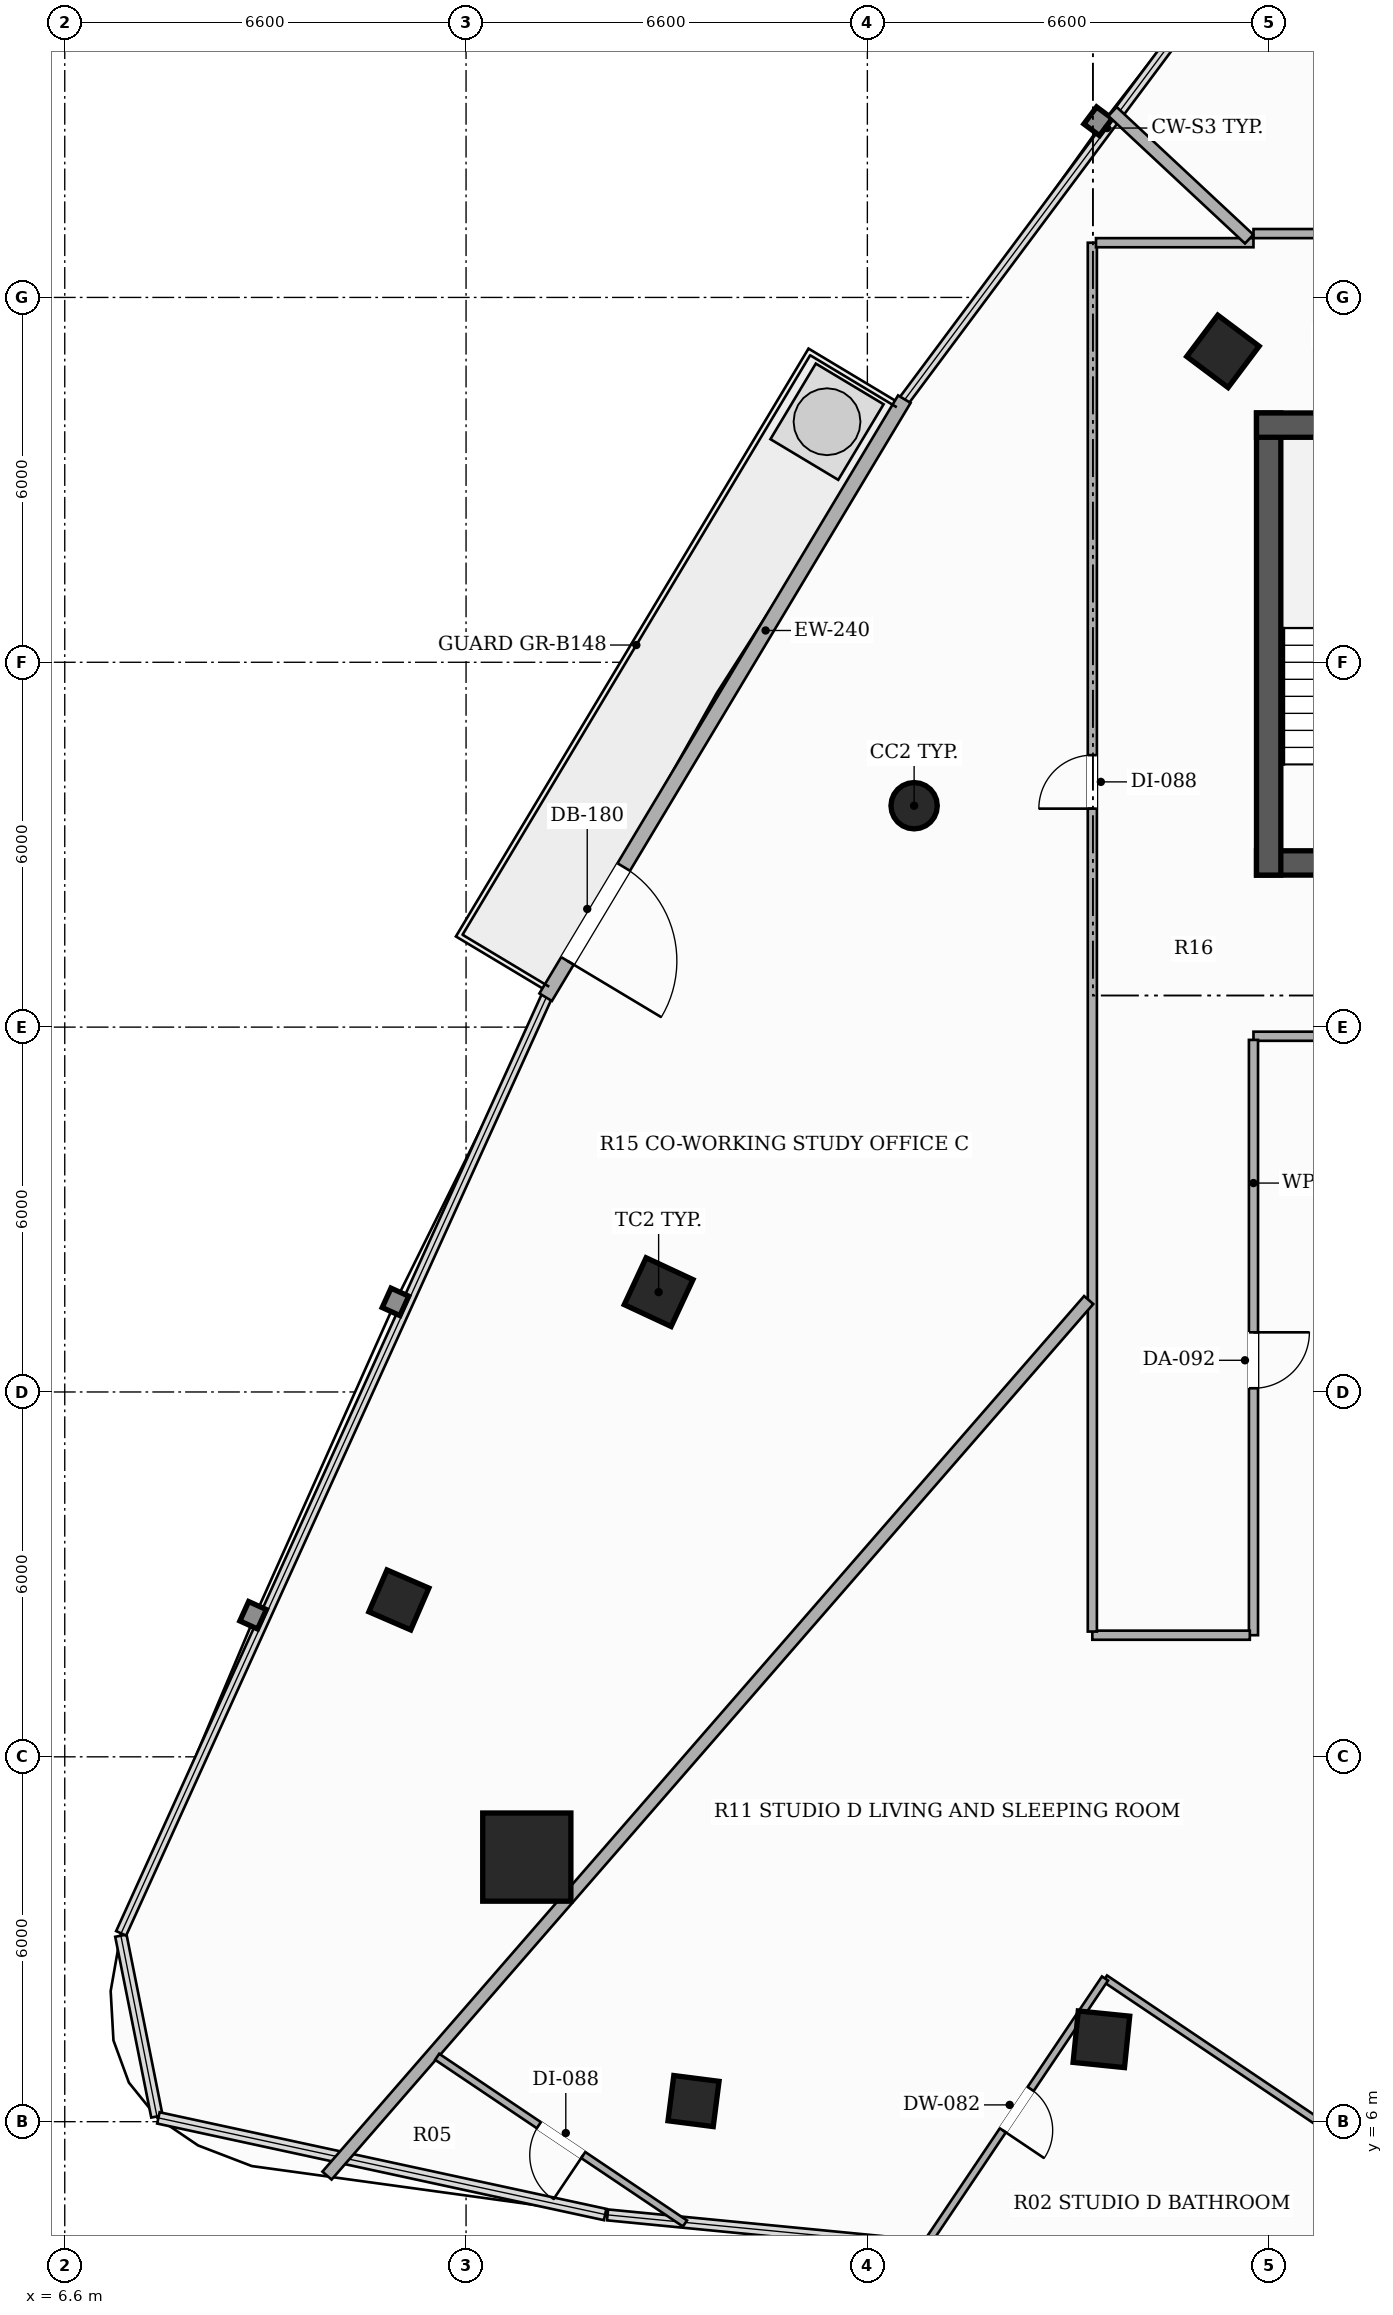
"""IFC4 building model, lengths in metres.
Left out: names, types, materials, properties, quantities, classifications, styles, units other than length and angle.
Written with IfcOpenShell. Run it as: python <this file> out.ifc"""

import sys

from ifc_helpers import new_model, si_unit, direction, frame, frame_2d, origin, origin_2d, place, context, subcontext, project, spatial, rectangle, hollow_rectangle, hollow_circle, extrude, element, fill, save


model = new_model("IFC4")
c1 = context("Model", 3, precision=1e-05, world=origin(), true_north=direction((0.0, 1.0)))
c2 = subcontext(c1, "Body", "Model", "MODEL_VIEW")
j1 = project(units=[si_unit("LENGTHUNIT", "METRE"), si_unit("PLANEANGLEUNIT", "RADIAN")], contexts=[c1])
p1 = place(None, origin())
s1 = spatial("IfcSite", under=j1, at=p1, CompositionType="ELEMENT")
p2 = place(p1, origin())
s2 = spatial("IfcBuilding", under=s1, at=p2, CompositionType="ELEMENT")
p3 = place(p2, frame((0.0, 0.0, 136.4)))
s3 = spatial("IfcBuildingStorey", under=s2, at=p3, CompositionType="ELEMENT", Elevation=136.4)
p4 = place(p3, frame((26.2, 26.7, 0.0), z_axis=(0.0, 0.0, 1.0), x_axis=(1.0, 0.0, 0.0)))
e1 = element("IfcWall", 1, at=p4, inside=s3, PredefinedType="SHEAR", context=c2, shape_type="SweptSolid", body=[
    extrude(rectangle(XDim=13.6, YDim=0.4, at=frame_2d((6.8, 0.0))), origin(), (0.0, 0.0, 1.0), 3.3),
])
p5 = place(p4, frame((4.35, 0.0, 0.0)))
e2 = element("IfcOpeningElement", 2, at=p5, cuts=e1, PredefinedType="OPENING", context=c2, shape_type="SweptSolid", body=[
    extrude(rectangle(XDim=1.05, YDim=2.15, at=frame_2d((0.525, 1.075))), frame((0.0, 0.21, 0.0), z_axis=(0.0, -1.0, 0.0), x_axis=(1.0, 0.0, 0.0)), (0.0, 0.0, 1.0), 0.42),
])
p6 = place(p4, frame((8.3, 0.0, 0.0)))
e3 = element("IfcOpeningElement", 3, at=p6, cuts=e1, PredefinedType="OPENING", context=c2, shape_type="SweptSolid", body=[
    extrude(rectangle(XDim=1.05, YDim=2.15, at=frame_2d((0.525, 1.075))), frame((0.0, 0.21, 0.0), z_axis=(0.0, -1.0, 0.0), x_axis=(1.0, 0.0, 0.0)), (0.0, 0.0, 1.0), 0.42),
])
p7 = place(p3, frame((26.4, 26.5, 0.0), z_axis=(0.0, 0.0, 1.0), x_axis=(0.0, 1.0, 0.0)))
e4 = element("IfcWall", 4, at=p7, inside=s3, PredefinedType="SHEAR", context=c2, shape_type="SweptSolid", body=[
    extrude(rectangle(XDim=7.6, YDim=0.4, at=frame_2d((3.8, 0.0))), origin(), (0.0, 0.0, 1.0), 3.3),
])
p8 = place(p3, frame((26.2, 33.9, 0.0), z_axis=(0.0, 0.0, 1.0), x_axis=(1.0, 0.0, 0.0)))
e5 = element("IfcWall", 5, at=p8, inside=s3, PredefinedType="SHEAR", context=c2, shape_type="SweptSolid", body=[
    extrude(rectangle(XDim=3.68, YDim=0.4, at=frame_2d((1.84, 0.0))), origin(), (0.0, 0.0, 1.0), 3.3),
])
p9 = place(p3, frame((14.199, 10.351, 0.0), z_axis=(0.0, 0.0, 1.0), x_axis=(1.0, 0.0, 0.0)))
e6 = element("IfcColumn", 6, at=p9, inside=s3, PredefinedType="COLUMN", context=c2, shape_type="SweptSolid", body=[
    extrude(hollow_rectangle(XDim=1.45, YDim=1.45, WallThickness=0.045, at=origin_2d()), origin(), (0.0, 0.0, 1.0), 3.3),
])
p10 = place(p3, frame((25.648, 35.113, 0.0), z_axis=(0.0, 0.0, 1.0), x_axis=(0.600420225326, 0.799684658487, 0.0)))
e7 = element("IfcColumn", 7, at=p10, inside=s3, PredefinedType="COLUMN", context=c2, shape_type="SweptSolid", body=[
    extrude(hollow_rectangle(XDim=0.85, YDim=0.85, WallThickness=0.028, at=origin_2d()), origin(), (0.0, 0.0, 1.0), 3.3),
])
p11 = place(p3, frame((20.569, 27.641, 0.0), z_axis=(0.0, 0.0, 1.0), x_axis=(1.0, 0.0, 0.0)))
e8 = element("IfcColumn", 8, at=p11, inside=s3, PredefinedType="COLUMN", context=c2, shape_type="SweptSolid", body=[
    extrude(hollow_circle(Radius=0.381, WallThickness=0.022, at=origin_2d()), origin(), (0.0, 0.0, 1.0), 3.3),
])
for number, where, z_axis, x_axis in (
    (9, (16.367, 19.642, 0.0), (0.0, 0.0, 1.0), (0.423, 0.906, 0.0)),
    (10, (23.649, 7.355, 0.0), (0.0, 0.0, 1.0), (-0.995, 0.101, 0.0)),
):
    element("IfcColumn", number, at=place(p3, frame(where, z_axis=z_axis, x_axis=x_axis)), inside=s3, PredefinedType="COLUMN", context=c2, shape_type="SweptSolid", body=[
        extrude(hollow_rectangle(XDim=0.85, YDim=0.85, WallThickness=0.028, at=origin_2d()), origin(), (0.0, 0.0, 1.0), 3.3),
    ])
for number, where, z_axis, x_axis in (
    (11, (12.095, 14.58, 0.0), (0.0, 0.0, 1.0), (0.397, 0.918, 0.0)),
    (12, (16.941, 6.339, 0.0), (0.0, 0.0, 1.0), (-0.992, 0.127, 0.0)),
):
    element("IfcColumn", number, at=place(p3, frame(where, z_axis=z_axis, x_axis=x_axis)), inside=s3, PredefinedType="COLUMN", context=c2, shape_type="SweptSolid", body=[
        extrude(hollow_rectangle(XDim=0.75, YDim=0.75, WallThickness=0.025, at=origin_2d()), origin(), (0.0, 0.0, 1.0), 3.3),
    ])
p12 = place(p3, frame((20.408, 34.327, 0.0), z_axis=(0.0, 0.0, 1.0), x_axis=(-0.514364263751, -0.857571807009, 0.0)))
e13 = element("IfcWall", 13, at=p12, inside=s3, PredefinedType="SOLIDWALL", context=c2, shape_type="SweptSolid", body=[
    extrude(rectangle(XDim=11.468, YDim=0.24, at=frame_2d((5.734, 0.0))), origin(), (0.0, 0.0, 1.0), 2.624),
])
p13 = place(p12, frame((8.972, 0.0, 0.0)))
e14 = element("IfcOpeningElement", 14, at=p13, cuts=e13, PredefinedType="OPENING", context=c2, shape_type="SweptSolid", body=[
    extrude(rectangle(XDim=1.8, YDim=2.2, at=frame_2d((0.9, 1.1))), frame((0.0, 0.13, 0.0), z_axis=(0.0, -1.0, 0.0), x_axis=(1.0, 0.0, 0.0)), (0.0, 0.0, 1.0), 0.26),
])
p14 = place(p3, frame((31.844, 23.85, 0.0), z_axis=(0.0, 0.0, 1.0), x_axis=(-1.0, 0.0, 0.0)))
e15 = element("IfcWall", 15, at=p14, inside=s3, PredefinedType="PARTITIONING", context=c2, shape_type="SweptSolid", body=[
    extrude(rectangle(XDim=5.694, YDim=0.15, at=frame_2d((2.847, 0.0))), origin(), (0.0, 0.0, 1.0), 2.721),
])
p15 = place(p3, frame((26.15, 23.79, 0.0), z_axis=(0.0, 0.0, 1.0), x_axis=(0.0, -1.0, 0.0)))
e16 = element("IfcWall", 16, at=p15, inside=s3, PredefinedType="PARTITIONING", context=c2, shape_type="SweptSolid", body=[
    extrude(rectangle(XDim=9.79, YDim=0.15, at=frame_2d((4.895, 0.0))), origin(), (0.0, 0.0, 1.0), 2.721),
])
p16 = place(p15, frame((4.809, 0.0, 0.0)))
e17 = element("IfcOpeningElement", 17, at=p16, cuts=e16, PredefinedType="OPENING", context=c2, shape_type="SweptSolid", body=[
    extrude(rectangle(XDim=0.92, YDim=2.15, at=frame_2d((0.46, 1.075))), frame((0.0, 0.085, 0.0), z_axis=(0.0, -1.0, 0.0), x_axis=(1.0, 0.0, 0.0)), (0.0, 0.0, 1.0), 0.17),
])
p17 = place(p3, frame((26.09, 14.0, 0.0), z_axis=(0.0, 0.0, 1.0), x_axis=(-1.0, 0.0, 0.0)))
e18 = element("IfcWall", 18, at=p17, inside=s3, PredefinedType="PARTITIONING", context=c2, shape_type="SweptSolid", body=[
    extrude(rectangle(XDim=2.59, YDim=0.15, at=frame_2d((1.295, 0.0))), origin(), (0.0, 0.0, 1.0), 2.721),
])
p18 = place(p3, frame((23.5, 14.06, 0.0), z_axis=(0.0, 0.0, 1.0), x_axis=(0.0, 1.0, 0.0)))
e19 = element("IfcWall", 19, at=p18, inside=s3, PredefinedType="PARTITIONING", context=c2, shape_type="SweptSolid", body=[
    extrude(rectangle(XDim=22.84, YDim=0.15, at=frame_2d((11.42, 0.0))), origin(), (0.0, 0.0, 1.0), 2.413),
])
p19 = place(p18, frame((13.533, 0.0, 0.0)))
e20 = element("IfcOpeningElement", 20, at=p19, cuts=e19, PredefinedType="OPENING", context=c2, shape_type="SweptSolid", body=[
    extrude(rectangle(XDim=0.88, YDim=2.1, at=frame_2d((0.44, 1.05))), frame((0.0, 0.085, 0.0), z_axis=(0.0, -1.0, 0.0), x_axis=(1.0, 0.0, 0.0)), (0.0, 0.0, 1.0), 0.17),
])
p20 = place(p3, frame((23.56, 36.9, 0.0), z_axis=(0.0, 0.0, 1.0), x_axis=(1.0, 0.0, 0.0)))
e21 = element("IfcWall", 21, at=p20, inside=s3, PredefinedType="PARTITIONING", context=c2, shape_type="SweptSolid", body=[
    extrude(rectangle(XDim=2.59, YDim=0.15, at=frame_2d((1.295, 0.0))), origin(), (0.0, 0.0, 1.0), 2.413),
])
p21 = place(p3, frame((26.15, 37.05, 0.0), z_axis=(0.0, 0.0, 1.0), x_axis=(1.0, 0.0, 0.0)))
e22 = element("IfcWall", 22, at=p21, inside=s3, PredefinedType="PARTITIONING", context=c2, shape_type="SweptSolid", body=[
    extrude(rectangle(XDim=2.0, YDim=0.15, at=frame_2d((1.0, 0.0))), origin(), (0.0, 0.0, 1.0), 2.413),
])
p22 = place(p3, frame((26.079, 36.96, 0.0), z_axis=(0.0, 0.0, 1.0), x_axis=(-0.730912649308, 0.682471024354, 0.0)))
e23 = element("IfcWall", 23, at=p22, inside=s3, PredefinedType="PARTITIONING", context=c2, shape_type="SweptSolid", body=[
    extrude(rectangle(XDim=3.074, YDim=0.2, at=frame_2d((1.537, 0.0))), origin(), (0.0, 0.0, 1.0), 2.413),
])
p23 = place(p3, frame((23.44, 19.512, 0.0), z_axis=(0.0, 0.0, 1.0), x_axis=(-0.656359216658, -0.754448526215, 0.0)))
e24 = element("IfcWall", 24, at=p23, inside=s3, PredefinedType="PARTITIONING", context=c2, shape_type="SweptSolid", body=[
    extrude(rectangle(XDim=19.085, YDim=0.2, at=frame_2d((9.543, 0.0))), origin(), (0.0, 0.0, 1.0), 2.413),
])
p24 = place(p3, frame((27.879, 5.548, 0.0), z_axis=(0.0, 0.0, 1.0), x_axis=(-0.829629274352, 0.558314666777, 0.0)))
e25 = element("IfcWall", 25, at=p24, inside=s3, PredefinedType="PARTITIONING", context=c2, shape_type="SweptSolid", body=[
    extrude(rectangle(XDim=5.027, YDim=0.12, at=frame_2d((2.514, 0.0))), origin(), (0.0, 0.0, 1.0), 2.413),
])
p25 = place(p3, frame((23.708, 8.355, 0.0), z_axis=(0.0, 0.0, 1.0), x_axis=(-0.55815233332, -0.829738496642, 0.0)))
e26 = element("IfcWall", 26, at=p25, inside=s3, PredefinedType="PARTITIONING", context=c2, shape_type="SweptSolid", body=[
    extrude(rectangle(XDim=5.395, YDim=0.12, at=frame_2d((2.697, 0.0))), origin(), (0.0, 0.0, 1.0), 2.413),
])
p26 = place(p25, frame((2.19, 0.0, 0.0)))
e27 = element("IfcOpeningElement", 27, at=p26, cuts=e26, PredefinedType="OPENING", context=c2, shape_type="SweptSolid", body=[
    extrude(rectangle(XDim=0.82, YDim=2.1, at=frame_2d((0.41, 1.05))), frame((0.0, 0.07, 0.0), z_axis=(0.0, -1.0, 0.0), x_axis=(1.0, 0.0, 0.0)), (0.0, 0.0, 1.0), 0.14),
])
p27 = place(p3, frame((16.8, 4.326, 0.0), z_axis=(0.0, 0.0, 1.0), x_axis=(-0.829756434678, 0.558125666056, 0.0)))
e28 = element("IfcWall", 28, at=p27, inside=s3, PredefinedType="PARTITIONING", context=c2, shape_type="SweptSolid", body=[
    extrude(rectangle(XDim=4.911, YDim=0.12, at=frame_2d((2.456, 0.0))), origin(), (0.0, 0.0, 1.0), 3.06),
])
p28 = place(p27, frame((2.016, 0.0, 0.0)))
e29 = element("IfcOpeningElement", 29, at=p28, cuts=e28, PredefinedType="OPENING", context=c2, shape_type="SweptSolid", body=[
    extrude(rectangle(XDim=0.88, YDim=2.1, at=frame_2d((0.44, 1.05))), frame((0.0, 0.07, 0.0), z_axis=(0.0, -1.0, 0.0), x_axis=(1.0, 0.0, 0.0)), (0.0, 0.0, 1.0), 0.14),
])
p29 = place(p13, origin())
e30 = element("IfcDoor", 30, at=p29, inside=s3, OperationType="SINGLE_SWING_RIGHT", PredefinedType="DOOR", context=c2, shape_type="SweptSolid", body=[
    extrude(rectangle(XDim=1.8, YDim=2.2, at=frame_2d((0.9, 1.1))), frame((0.0, 0.025, 0.0), z_axis=(0.0, -1.0, 0.0), x_axis=(1.0, 0.0, 0.0)), (0.0, 0.0, 1.0), 0.05),
])
fill(e14, e30)
p30 = place(p19, origin())
e31 = element("IfcDoor", 31, at=p30, inside=s3, OperationType="SINGLE_SWING_LEFT", PredefinedType="DOOR", context=c2, shape_type="SweptSolid", body=[
    extrude(rectangle(XDim=0.88, YDim=2.1, at=frame_2d((0.44, 1.05))), frame((0.0, 0.025, 0.0), z_axis=(0.0, -1.0, 0.0), x_axis=(1.0, 0.0, 0.0)), (0.0, 0.0, 1.0), 0.05),
])
fill(e20, e31)
p31 = place(p16, origin())
e32 = element("IfcDoor", 32, at=p31, inside=s3, OperationType="SINGLE_SWING_LEFT", PredefinedType="DOOR", context=c2, shape_type="SweptSolid", body=[
    extrude(rectangle(XDim=0.92, YDim=2.15, at=frame_2d((0.46, 1.075))), frame((0.0, 0.025, 0.0), z_axis=(0.0, -1.0, 0.0), x_axis=(1.0, 0.0, 0.0)), (0.0, 0.0, 1.0), 0.05),
])
fill(e17, e32)
p32 = place(p26, origin())
e33 = element("IfcDoor", 33, at=p32, inside=s3, OperationType="SINGLE_SWING_RIGHT", PredefinedType="DOOR", context=c2, shape_type="SweptSolid", body=[
    extrude(rectangle(XDim=0.82, YDim=2.1, at=frame_2d((0.41, 1.05))), frame((0.0, 0.025, 0.0), z_axis=(0.0, -1.0, 0.0), x_axis=(1.0, 0.0, 0.0)), (0.0, 0.0, 1.0), 0.05),
])
fill(e27, e33)
p33 = place(p28, origin())
e34 = element("IfcDoor", 34, at=p33, inside=s3, OperationType="SINGLE_SWING_LEFT", PredefinedType="DOOR", context=c2, shape_type="SweptSolid", body=[
    extrude(rectangle(XDim=0.88, YDim=2.1, at=frame_2d((0.44, 1.05))), frame((0.0, 0.025, 0.0), z_axis=(0.0, -1.0, 0.0), x_axis=(1.0, 0.0, 0.0)), (0.0, 0.0, 1.0), 0.05),
])
fill(e29, e34)
save(model, sys.argv[1])
